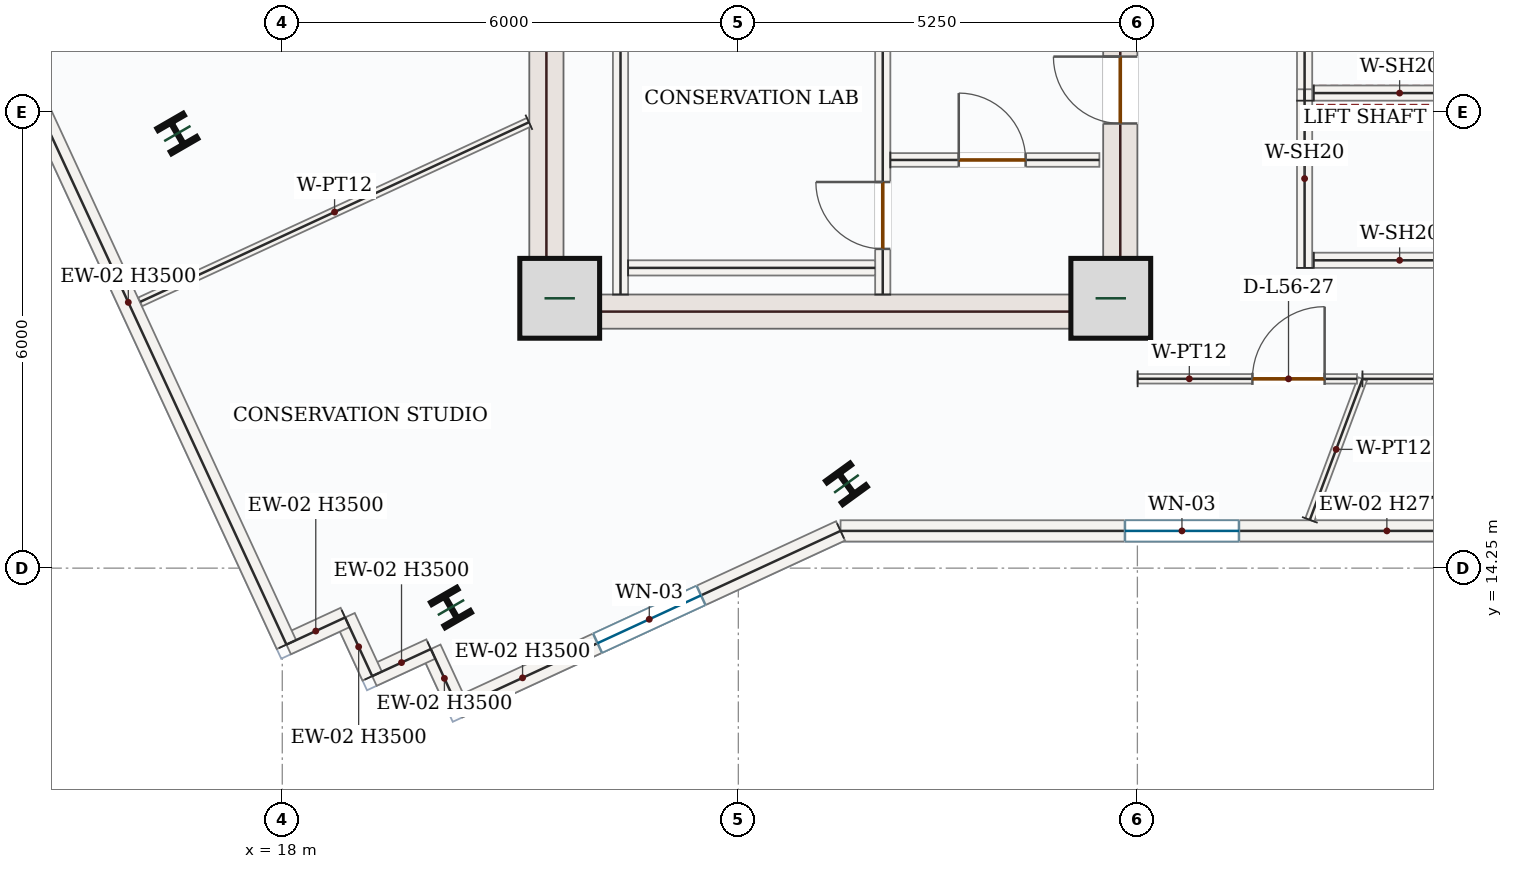
"""IFC4 building model, lengths in metres.
Left out: names, types, materials, properties, quantities, classifications, styles, units other than length and angle.
Written with IfcOpenShell. Run it as: python <this file> out.ifc"""

import sys

from ifc_helpers import new_model, si_unit, direction, frame, frame_2d, origin, origin_2d, place, context, subcontext, project, spatial, rectangle, i_section, extrude, source, transform, mapped, element, fill, save


model = new_model("IFC4")
c1 = context("Model", 3, precision=1e-05, world=origin(), true_north=direction((0.0, 1.0)))
c2 = subcontext(c1, "Body", "Model", "MODEL_VIEW")
j1 = project(units=[si_unit("LENGTHUNIT", "METRE"), si_unit("PLANEANGLEUNIT", "RADIAN")], contexts=[c1])
p1 = place(None, origin())
s1 = spatial("IfcSite", under=j1, at=p1, CompositionType="ELEMENT")
p2 = place(p1, origin())
s2 = spatial("IfcBuilding", under=s1, at=p2, CompositionType="ELEMENT")
p3 = place(p2, frame((0.0, 0.0, 239.1)))
s3 = spatial("IfcBuildingStorey", under=s2, at=p3, CompositionType="ELEMENT", Elevation=239.1)
m1 = source(origin(), c2, "Body", "SweptSolid", [
    extrude(rectangle(XDim=8.55, YDim=0.45, at=frame_2d((4.275, 0.0))), origin(), (0.0, 0.0, 1.0), 3.5),
])
p4 = place(p3, frame((21.475, 17.4, 0.0), z_axis=(0.0, 0.0, 1.0), x_axis=(0.0, 1.0, 0.0)))
e1 = element("IfcWall", 1, at=p4, inside=s3, PredefinedType="SHEAR", context=c2, shape_type="MappedRepresentation", body=[
    mapped(m1, transform((0.0, 0.0, 0.0), x_axis=(1.0, 0.0, 0.0), y_axis=(0.0, 1.0, 0.0), z_axis=(0.0, 0.0, 1.0), scale=1.0)),
])
p5 = place(p3, frame((29.025, 17.4, 0.0), z_axis=(0.0, 0.0, 1.0), x_axis=(0.0, 1.0, 0.0)))
e2 = element("IfcWall", 2, at=p5, inside=s3, PredefinedType="SHEAR", context=c2, shape_type="SweptSolid", body=[
    extrude(rectangle(XDim=8.55, YDim=0.45, at=frame_2d((4.275, 0.0))), origin(), (0.0, 0.0, 1.0), 3.5),
])
p6 = place(p5, frame((6.65, 0.0, 0.0)))
e3 = element("IfcOpeningElement", 3, at=p6, cuts=e2, PredefinedType="OPENING", context=c2, shape_type="SweptSolid", body=[
    extrude(rectangle(XDim=1.1, YDim=2.2, at=frame_2d((0.55, 1.1))), frame((0.0, 0.235, 0.0), z_axis=(0.0, -1.0, 0.0), x_axis=(1.0, 0.0, 0.0)), (0.0, 0.0, 1.0), 0.47),
])
p7 = place(p5, frame((2.7, 0.0, 0.0)))
e4 = element("IfcOpeningElement", 4, at=p7, cuts=e2, PredefinedType="OPENING", context=c2, shape_type="SweptSolid", body=[
    extrude(rectangle(XDim=0.88, YDim=2.1, at=frame_2d((0.44, 1.05))), frame((0.0, 0.235, 0.0), z_axis=(0.0, -1.0, 0.0), x_axis=(1.0, 0.0, 0.0)), (0.0, 0.0, 1.0), 0.47),
])
p8 = place(p5, frame((4.6, 0.0, 0.0)))
e5 = element("IfcOpeningElement", 5, at=p8, cuts=e2, PredefinedType="OPENING", context=c2, shape_type="SweptSolid", body=[
    extrude(rectangle(XDim=0.88, YDim=2.1, at=frame_2d((0.44, 1.05))), frame((0.0, 0.235, 0.0), z_axis=(0.0, -1.0, 0.0), x_axis=(1.0, 0.0, 0.0)), (0.0, 0.0, 1.0), 0.47),
])
m2 = source(origin(), c2, "Body", "SweptSolid", [
    extrude(rectangle(XDim=7.1, YDim=0.45, at=frame_2d((3.55, 0.0))), origin(), (0.0, 0.0, 1.0), 3.5),
])
p9 = place(p3, frame((21.7, 17.625, 0.0), z_axis=(0.0, 0.0, 1.0), x_axis=(1.0, 0.0, 0.0)))
e6 = element("IfcWall", 6, at=p9, inside=s3, PredefinedType="SHEAR", context=c2, shape_type="MappedRepresentation", body=[
    mapped(m2, transform((0.0, 0.0, 0.0), x_axis=(1.0, 0.0, 0.0), y_axis=(0.0, 1.0, 0.0), z_axis=(0.0, 0.0, 1.0), scale=1.0)),
])
m3 = source(origin(), c2, "Body", "SweptSolid", [
    extrude(rectangle(XDim=1.05, YDim=1.05, at=origin_2d()), origin(), (0.0, 0.0, 1.0), 3.75),
])
for number, where, z_axis, x_axis in (
    (7, (21.65, 17.8, 0.0), (0.0, 0.0, 1.0), (1.0, 0.0, 0.0)),
    (8, (28.9, 17.8, 0.0), (0.0, 0.0, 1.0), (1.0, 0.0, 0.0)),
):
    element("IfcColumn", number, at=place(p3, frame(where, z_axis=z_axis, x_axis=x_axis)), inside=s3, PredefinedType="COLUMN", context=c2, shape_type="MappedRepresentation", body=[
        mapped(m3, transform((0.0, 0.0, 0.0), x_axis=(1.0, 0.0, 0.0), y_axis=(0.0, 1.0, 0.0), z_axis=(0.0, 0.0, 1.0), scale=1.0)),
    ])
m4 = source(origin(), c2, "Body", "SweptSolid", [
    extrude(i_section(OverallWidth=0.399, OverallDepth=0.386, WebThickness=0.021, FlangeThickness=0.033, FilletRadius=0.018, at=origin_2d()), origin(), (0.0, 0.0, 1.0), 3.75),
])
for number, where, z_axis, x_axis in (
    (9, (25.422, 15.359, 0.0), (0.0, 0.0, 1.0), (0.809, 0.588, 0.0)),
    (10, (16.62, 19.968, 0.0), (0.0, 0.0, 1.0), (0.866, 0.5, 0.0)),
    (11, (20.22, 13.732, 0.0), (0.0, 0.0, 1.0), (0.866, 0.5, 0.0)),
):
    element("IfcColumn", number, at=place(p3, frame(where, z_axis=z_axis, x_axis=x_axis)), inside=s3, PredefinedType="COLUMN", context=c2, shape_type="MappedRepresentation", body=[
        mapped(m4, transform((0.0, 0.0, 0.0), x_axis=(1.0, 0.0, 0.0), y_axis=(0.0, 1.0, 0.0), z_axis=(0.0, 0.0, 1.0), scale=1.0)),
    ])
p10 = place(p3, frame((34.328, 14.74, 0.0), z_axis=(0.0, 0.0, 1.0), x_axis=(-1.0, 0.0, 0.0)))
e12 = element("IfcWall", 12, at=p10, inside=s3, PredefinedType="SOLIDWALL", context=c2, shape_type="SweptSolid", body=[
    extrude(rectangle(XDim=8.984, YDim=0.28, at=frame_2d((4.492, 0.0))), origin(), (0.0, 0.0, 1.0), 2.772),
])
p11 = place(p10, frame((3.742, 0.0, 0.85)))
e13 = element("IfcOpeningElement", 13, at=p11, cuts=e12, PredefinedType="OPENING", context=c2, shape_type="SweptSolid", body=[
    extrude(rectangle(XDim=1.5, YDim=1.5, at=frame_2d((0.75, 0.75))), frame((0.0, 0.15, 0.0), z_axis=(0.0, -1.0, 0.0), x_axis=(1.0, 0.0, 0.0)), (0.0, 0.0, 1.0), 0.3),
])
p12 = place(p3, frame((25.345, 14.74, 0.0), z_axis=(0.0, 0.0, 1.0), x_axis=(-0.907767275269, -0.419474163627, 0.0)))
e14 = element("IfcWall", 14, at=p12, inside=s3, PredefinedType="SOLIDWALL", context=c2, shape_type="SweptSolid", body=[
    extrude(rectangle(XDim=5.545, YDim=0.28, at=frame_2d((2.772, 0.0))), origin(), (0.0, 0.0, 1.0), 3.5),
])
p13 = place(p12, frame((2.022, 0.0, 0.85)))
e15 = element("IfcOpeningElement", 15, at=p13, cuts=e14, PredefinedType="OPENING", context=c2, shape_type="SweptSolid", body=[
    extrude(rectangle(XDim=1.5, YDim=1.5, at=frame_2d((0.75, 0.75))), frame((0.0, 0.15, 0.0), z_axis=(0.0, -1.0, 0.0), x_axis=(1.0, 0.0, 0.0)), (0.0, 0.0, 1.0), 0.3),
])
m5 = source(origin(), c2, "Body", "SweptSolid", [
    extrude(rectangle(XDim=0.85, YDim=0.28, at=frame_2d((0.425, 0.0))), origin(), (0.0, 0.0, 1.0), 3.5),
])
p14 = place(p3, frame((20.311, 12.414, 0.0), z_axis=(0.0, 0.0, 1.0), x_axis=(-0.419549800563, 0.907732320041, 0.0)))
e16 = element("IfcWall", 16, at=p14, inside=s3, PredefinedType="SOLIDWALL", context=c2, shape_type="MappedRepresentation", body=[
    mapped(m5, transform((0.0, 0.0, 0.0), x_axis=(1.0, 0.0, 0.0), y_axis=(0.0, 1.0, 0.0), z_axis=(0.0, 0.0, 1.0), scale=1.0)),
])
m6 = source(origin(), c2, "Body", "SweptSolid", [
    extrude(rectangle(XDim=0.85, YDim=0.28, at=frame_2d((0.425, 0.0))), origin(), (0.0, 0.0, 1.0), 3.5),
])
p15 = place(p3, frame((19.955, 13.186, 0.0), z_axis=(0.0, 0.0, 1.0), x_axis=(-0.907681752694, -0.41965919009, 0.0)))
e17 = element("IfcWall", 17, at=p15, inside=s3, PredefinedType="SOLIDWALL", context=c2, shape_type="MappedRepresentation", body=[
    mapped(m6, transform((0.0, 0.0, 0.0), x_axis=(1.0, 0.0, 0.0), y_axis=(0.0, 1.0, 0.0), z_axis=(0.0, 0.0, 1.0), scale=1.0)),
])
for number, where, z_axis, x_axis in (
    (18, (19.183, 12.829, 0.0), (0.0, 0.0, 1.0), (-0.419, 0.908, 0.0)),
    (19, (18.827, 13.601, 0.0), (0.0, 0.0, 1.0), (-0.908, -0.419, 0.0)),
):
    element("IfcWall", number, at=place(p3, frame(where, z_axis=z_axis, x_axis=x_axis)), inside=s3, PredefinedType="SOLIDWALL", context=c2, shape_type="MappedRepresentation", body=[
        mapped(m5, transform((0.0, 0.0, 0.0), x_axis=(1.0, 0.0, 0.0), y_axis=(0.0, 1.0, 0.0), z_axis=(0.0, 0.0, 1.0), scale=1.0)),
    ])
m7 = source(origin(), c2, "Body", "SweptSolid", [
    extrude(rectangle(XDim=9.92, YDim=0.28, at=frame_2d((4.96, 0.0))), origin(), (0.0, 0.0, 1.0), 3.5),
])
p16 = place(p3, frame((18.055, 13.244, 0.0), z_axis=(0.0, 0.0, 1.0), x_axis=(-0.41946703495, 0.907770569357, 0.0)))
e20 = element("IfcWall", 20, at=p16, inside=s3, PredefinedType="SOLIDWALL", context=c2, shape_type="MappedRepresentation", body=[
    mapped(m7, transform((0.0, 0.0, 0.0), x_axis=(1.0, 0.0, 0.0), y_axis=(0.0, 1.0, 0.0), z_axis=(0.0, 0.0, 1.0), scale=1.0)),
])
m8 = source(origin(), c2, "Body", "SweptSolid", [
    extrude(rectangle(XDim=7.87, YDim=0.2, at=frame_2d((3.935, 0.0))), origin(), (0.0, 0.0, 1.0), 3.5),
])
p17 = place(p3, frame((22.45, 17.85, 0.0), z_axis=(0.0, 0.0, 1.0), x_axis=(0.0, 1.0, 0.0)))
e21 = element("IfcWall", 21, at=p17, inside=s3, PredefinedType="SOLIDWALL", context=c2, shape_type="MappedRepresentation", body=[
    mapped(m8, transform((0.0, 0.0, 0.0), x_axis=(1.0, 0.0, 0.0), y_axis=(0.0, 1.0, 0.0), z_axis=(0.0, 0.0, 1.0), scale=1.0)),
])
p18 = place(p3, frame((25.9, 17.85, 0.0), z_axis=(0.0, 0.0, 1.0), x_axis=(0.0, 1.0, 0.0)))
e22 = element("IfcWall", 22, at=p18, inside=s3, PredefinedType="SOLIDWALL", context=c2, shape_type="SweptSolid", body=[
    extrude(rectangle(XDim=8.0, YDim=0.2, at=frame_2d((4.0, 0.0))), origin(), (0.0, 0.0, 1.0), 3.5),
])
p19 = place(p18, frame((6.2, 0.0, 0.0)))
e23 = element("IfcOpeningElement", 23, at=p19, cuts=e22, PredefinedType="OPENING", context=c2, shape_type="SweptSolid", body=[
    extrude(rectangle(XDim=1.0, YDim=2.15, at=frame_2d((0.5, 1.075))), frame((0.0, 0.11, 0.0), z_axis=(0.0, -1.0, 0.0), x_axis=(1.0, 0.0, 0.0)), (0.0, 0.0, 1.0), 0.22),
])
p20 = place(p18, frame((0.6, 0.0, 0.0)))
e24 = element("IfcOpeningElement", 24, at=p20, cuts=e22, PredefinedType="OPENING", context=c2, shape_type="SweptSolid", body=[
    extrude(rectangle(XDim=0.88, YDim=2.1, at=frame_2d((0.44, 1.05))), frame((0.0, 0.11, 0.0), z_axis=(0.0, -1.0, 0.0), x_axis=(1.0, 0.0, 0.0)), (0.0, 0.0, 1.0), 0.22),
])
m9 = source(origin(), c2, "Body", "SweptSolid", [
    extrude(rectangle(XDim=3.25, YDim=0.2, at=frame_2d((1.625, 0.0))), origin(), (0.0, 0.0, 1.0), 3.5),
])
p21 = place(p3, frame((22.55, 18.2, 0.0), z_axis=(0.0, 0.0, 1.0), x_axis=(1.0, 0.0, 0.0)))
e25 = element("IfcWall", 25, at=p21, inside=s3, PredefinedType="SOLIDWALL", context=c2, shape_type="MappedRepresentation", body=[
    mapped(m9, transform((0.0, 0.0, 0.0), x_axis=(1.0, 0.0, 0.0), y_axis=(0.0, 1.0, 0.0), z_axis=(0.0, 0.0, 1.0), scale=1.0)),
])
p22 = place(p3, frame((26.0, 19.62, 0.0), z_axis=(0.0, 0.0, 1.0), x_axis=(1.0, 0.0, 0.0)))
e26 = element("IfcWall", 26, at=p22, inside=s3, PredefinedType="PARTITIONING", context=c2, shape_type="SweptSolid", body=[
    extrude(rectangle(XDim=2.75, YDim=0.18, at=frame_2d((1.375, 0.0))), origin(), (0.0, 0.0, 1.0), 3.5),
])
p23 = place(p22, frame((0.9, 0.0, 0.0)))
e27 = element("IfcOpeningElement", 27, at=p23, cuts=e26, PredefinedType="OPENING", context=c2, shape_type="SweptSolid", body=[
    extrude(rectangle(XDim=0.88, YDim=2.1, at=frame_2d((0.44, 1.05))), frame((0.0, 0.1, 0.0), z_axis=(0.0, -1.0, 0.0), x_axis=(1.0, 0.0, 0.0)), (0.0, 0.0, 1.0), 0.2),
])
m10 = source(origin(), c2, "Body", "SweptSolid", [
    extrude(rectangle(XDim=2.35, YDim=0.2, at=frame_2d((1.175, 0.0))), origin(), (0.0, 0.0, 1.0), 3.5),
])
p24 = place(p3, frame((31.45, 20.4, 0.0), z_axis=(0.0, 0.0, 1.0), x_axis=(0.0, 1.0, 0.0)))
e28 = element("IfcWall", 28, at=p24, inside=s3, PredefinedType="SOLIDWALL", context=c2, shape_type="MappedRepresentation", body=[
    mapped(m10, transform((0.0, 0.0, 0.0), x_axis=(1.0, 0.0, 0.0), y_axis=(0.0, 1.0, 0.0), z_axis=(0.0, 0.0, 1.0), scale=1.0)),
])
m11 = source(origin(), c2, "Body", "SweptSolid", [
    extrude(rectangle(XDim=2.26, YDim=0.2, at=frame_2d((1.13, 0.0))), origin(), (0.0, 0.0, 1.0), 3.5),
])
p25 = place(p3, frame((31.57, 20.5, 0.0), z_axis=(0.0, 0.0, 1.0), x_axis=(1.0, 0.0, 0.0)))
e29 = element("IfcWall", 29, at=p25, inside=s3, PredefinedType="SOLIDWALL", context=c2, shape_type="MappedRepresentation", body=[
    mapped(m11, transform((0.0, 0.0, 0.0), x_axis=(1.0, 0.0, 0.0), y_axis=(0.0, 1.0, 0.0), z_axis=(0.0, 0.0, 1.0), scale=1.0)),
])
p26 = place(p3, frame((31.45, 18.2, 0.0), z_axis=(0.0, 0.0, 1.0), x_axis=(0.0, 1.0, 0.0)))
e30 = element("IfcWall", 30, at=p26, inside=s3, PredefinedType="SOLIDWALL", context=c2, shape_type="MappedRepresentation", body=[
    mapped(m10, transform((0.0, 0.0, 0.0), x_axis=(1.0, 0.0, 0.0), y_axis=(0.0, 1.0, 0.0), z_axis=(0.0, 0.0, 1.0), scale=1.0)),
])
p27 = place(p3, frame((31.57, 18.3, 0.0), z_axis=(0.0, 0.0, 1.0), x_axis=(1.0, 0.0, 0.0)))
e31 = element("IfcWall", 31, at=p27, inside=s3, PredefinedType="SOLIDWALL", context=c2, shape_type="MappedRepresentation", body=[
    mapped(m11, transform((0.0, 0.0, 0.0), x_axis=(1.0, 0.0, 0.0), y_axis=(0.0, 1.0, 0.0), z_axis=(0.0, 0.0, 1.0), scale=1.0)),
])
p28 = place(p3, frame((32.211, 16.74, 0.0), z_axis=(0.0, 0.0, 1.0), x_axis=(1.0, 0.0, 0.0)))
e32 = element("IfcWall", 32, at=p28, inside=s3, PredefinedType="PARTITIONING", context=c2, shape_type="SweptSolid", body=[
    extrude(rectangle(XDim=5.236, YDim=0.125, at=frame_2d((2.618, 0.0))), origin(), (0.0, 0.0, 1.0), 3.5),
])
p29 = place(p28, frame((3.343, 0.0, 0.0)))
e33 = element("IfcOpeningElement", 33, at=p29, cuts=e32, PredefinedType="OPENING", context=c2, shape_type="SweptSolid", body=[
    extrude(rectangle(XDim=0.95, YDim=2.15, at=frame_2d((0.475, 1.075))), frame((0.0, 0.073, 0.0), z_axis=(0.0, -1.0, 0.0), x_axis=(1.0, 0.0, 0.0)), (0.0, 0.0, 1.0), 0.145),
])
m12 = source(origin(), c2, "Body", "SweptSolid", [
    extrude(rectangle(XDim=1.98, YDim=0.125, at=frame_2d((0.99, 0.0))), origin(), (0.0, 0.0, 1.0), 3.5),
])
p30 = place(p3, frame((31.519, 14.885, 0.0), z_axis=(0.0, 0.0, 1.0), x_axis=(0.349690675255, 0.9368652153, 0.0)))
e34 = element("IfcWall", 34, at=p30, inside=s3, PredefinedType="PARTITIONING", context=c2, shape_type="MappedRepresentation", body=[
    mapped(m12, transform((0.0, 0.0, 0.0), x_axis=(1.0, 0.0, 0.0), y_axis=(0.0, 1.0, 0.0), z_axis=(0.0, 0.0, 1.0), scale=1.0)),
])
m13 = source(origin(), c2, "Body", "SweptSolid", [
    extrude(rectangle(XDim=5.634, YDim=0.125, at=frame_2d((2.817, 0.0))), origin(), (0.0, 0.0, 1.0), 3.5),
])
p31 = place(p3, frame((21.245, 20.116, 0.0), z_axis=(0.0, 0.0, 1.0), x_axis=(-0.90777538002, -0.419456624014, 0.0)))
e35 = element("IfcWall", 35, at=p31, inside=s3, PredefinedType="PARTITIONING", context=c2, shape_type="MappedRepresentation", body=[
    mapped(m13, transform((0.0, 0.0, 0.0), x_axis=(1.0, 0.0, 0.0), y_axis=(0.0, 1.0, 0.0), z_axis=(0.0, 0.0, 1.0), scale=1.0)),
])
p32 = place(p3, frame((29.253, 16.741, 0.0), z_axis=(0.0, 0.0, 1.0), x_axis=(0.999999910531, -0.000423011806, 0.0)))
e36 = element("IfcWall", 36, at=p32, inside=s3, PredefinedType="PARTITIONING", context=c2, shape_type="SweptSolid", body=[
    extrude(rectangle(XDim=2.886, YDim=0.125, at=frame_2d((1.443, 0.0))), origin(), (0.0, 0.0, 1.0), 3.5),
])
p33 = place(p32, frame((1.51, 0.0, 0.0)))
e37 = element("IfcOpeningElement", 37, at=p33, cuts=e36, PredefinedType="OPENING", context=c2, shape_type="SweptSolid", body=[
    extrude(rectangle(XDim=0.95, YDim=2.15, at=frame_2d((0.475, 1.075))), frame((0.0, 0.073, 0.0), z_axis=(0.0, -1.0, 0.0), x_axis=(1.0, 0.0, 0.0)), (0.0, 0.0, 1.0), 0.145),
])
m14 = source(origin(), c2, "Body", "SweptSolid", [
    extrude(rectangle(XDim=1.5, YDim=1.5, at=frame_2d((0.75, 0.75))), frame((0.0, 0.03, 0.0), z_axis=(0.0, -1.0, 0.0), x_axis=(1.0, 0.0, 0.0)), (0.0, 0.0, 1.0), 0.06),
])
p34 = place(p11, origin())
e38 = element("IfcWindow", 38, at=p34, inside=s3, PartitioningType="SINGLE_PANEL", PredefinedType="WINDOW", context=c2, shape_type="MappedRepresentation", body=[
    mapped(m14, transform((0.0, 0.0, 0.0), x_axis=(1.0, 0.0, 0.0), y_axis=(0.0, 1.0, 0.0), z_axis=(0.0, 0.0, 1.0), scale=1.0)),
])
fill(e13, e38)
p35 = place(p13, origin())
e39 = element("IfcWindow", 39, at=p35, inside=s3, PartitioningType="SINGLE_PANEL", PredefinedType="WINDOW", context=c2, shape_type="MappedRepresentation", body=[
    mapped(m14, transform((0.0, 0.0, 0.0), x_axis=(1.0, 0.0, 0.0), y_axis=(0.0, 1.0, 0.0), z_axis=(0.0, 0.0, 1.0), scale=1.0)),
])
fill(e15, e39)
m15 = source(origin(), c2, "Body", "SweptSolid", [
    extrude(rectangle(XDim=0.88, YDim=2.1, at=frame_2d((0.44, 1.05))), frame((0.0, 0.025, 0.0), z_axis=(0.0, -1.0, 0.0), x_axis=(1.0, 0.0, 0.0)), (0.0, 0.0, 1.0), 0.05),
])
p36 = place(p20, origin())
e40 = element("IfcDoor", 40, at=p36, inside=s3, OperationType="SINGLE_SWING_RIGHT", PredefinedType="DOOR", context=c2, shape_type="MappedRepresentation", body=[
    mapped(m15, transform((0.0, 0.0, 0.0), x_axis=(1.0, 0.0, 0.0), y_axis=(0.0, 1.0, 0.0), z_axis=(0.0, 0.0, 1.0), scale=1.0)),
])
fill(e24, e40)
p37 = place(p23, origin())
e41 = element("IfcDoor", 41, at=p37, inside=s3, OperationType="SINGLE_SWING_LEFT", PredefinedType="DOOR", context=c2, shape_type="MappedRepresentation", body=[
    mapped(m15, transform((0.0, 0.0, 0.0), x_axis=(1.0, 0.0, 0.0), y_axis=(0.0, 1.0, 0.0), z_axis=(0.0, 0.0, 1.0), scale=1.0)),
])
fill(e27, e41)
p38 = place(p7, origin())
e42 = element("IfcDoor", 42, at=p38, inside=s3, OperationType="SINGLE_SWING_RIGHT", PredefinedType="DOOR", context=c2, shape_type="MappedRepresentation", body=[
    mapped(m15, transform((0.0, 0.0, 0.0), x_axis=(1.0, 0.0, 0.0), y_axis=(0.0, 1.0, 0.0), z_axis=(0.0, 0.0, 1.0), scale=1.0)),
])
fill(e4, e42)
m16 = source(origin(), c2, "Body", "SweptSolid", [
    extrude(rectangle(XDim=0.95, YDim=2.15, at=frame_2d((0.475, 1.075))), frame((0.0, 0.025, 0.0), z_axis=(0.0, -1.0, 0.0), x_axis=(1.0, 0.0, 0.0)), (0.0, 0.0, 1.0), 0.05),
])
p39 = place(p33, origin())
e43 = element("IfcDoor", 43, at=p39, inside=s3, OperationType="SINGLE_SWING_RIGHT", PredefinedType="DOOR", context=c2, shape_type="MappedRepresentation", body=[
    mapped(m16, transform((0.0, 0.0, 0.0), x_axis=(1.0, 0.0, 0.0), y_axis=(0.0, 1.0, 0.0), z_axis=(0.0, 0.0, 1.0), scale=1.0)),
])
fill(e37, e43)
save(model, sys.argv[1])
